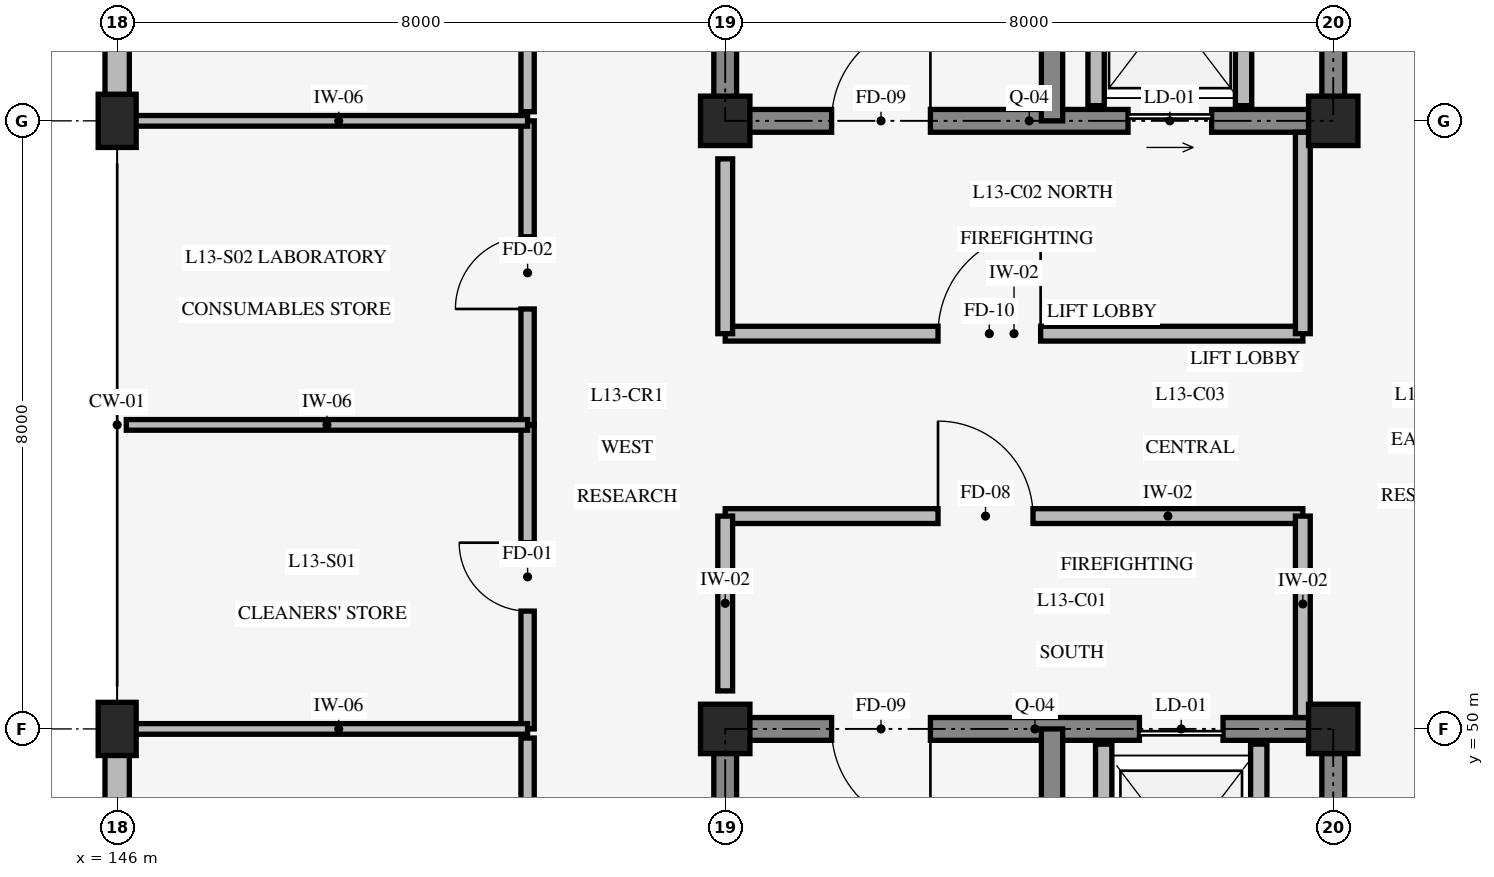
"""IFC4 building model, lengths in metres.
Left out: names, types, materials, properties, quantities, classifications, styles, units other than length and angle.
Written with IfcOpenShell. Run it as: python <this file> out.ifc"""

import sys

from ifc_helpers import new_model, si_unit, direction, frame, frame_2d, origin, origin_2d, place, context, subcontext, project, spatial, rectangle, extrude, element, fill, save


model = new_model("IFC4")
c1 = context("Model", 3, precision=1e-05, world=origin(), true_north=direction((0.0, 1.0)))
c2 = subcontext(c1, "Body", "Model", "MODEL_VIEW")
j1 = project(units=[si_unit("LENGTHUNIT", "METRE"), si_unit("PLANEANGLEUNIT", "RADIAN")], contexts=[c1])
p1 = place(None, origin())
s1 = spatial("IfcSite", under=j1, at=p1, CompositionType="ELEMENT")
p2 = place(p1, origin())
s2 = spatial("IfcBuilding", under=s1, at=p2, CompositionType="ELEMENT")
p3 = place(p2, frame((0.0, 0.0, 52.8)))
s3 = spatial("IfcBuildingStorey", under=s2, at=p3, CompositionType="ELEMENT", Elevation=52.8)
p4 = place(p3, frame((162.0, 42.0, 0.0), z_axis=(0.0, 0.0, 1.0), x_axis=(0.0, 1.0, 0.0)))
e1 = element("IfcWall", 1, at=p4, inside=s3, PredefinedType="SHEAR", context=c2, shape_type="SweptSolid", body=[
    extrude(rectangle(XDim=8.0, YDim=0.3, at=frame_2d((4.0, 0.0))), origin(), (0.0, 0.0, 1.0), 3.95),
])
p5 = place(p4, frame((3.175, 0.0, 0.0)))
e2 = element("IfcOpeningElement", 2, at=p5, cuts=e1, PredefinedType="OPENING", context=c2, shape_type="SweptSolid", body=[
    extrude(rectangle(XDim=1.05, YDim=2.2, at=frame_2d((0.525, 1.1))), frame((0.0, 0.16, 0.0), z_axis=(0.0, -1.0, 0.0), x_axis=(1.0, 0.0, 0.0)), (0.0, 0.0, 1.0), 0.32),
])
p6 = place(p3, frame((162.0, 50.0, 0.0), z_axis=(0.0, 0.0, 1.0), x_axis=(-1.0, 0.0, 0.0)))
e3 = element("IfcWall", 3, at=p6, inside=s3, PredefinedType="SHEAR", context=c2, shape_type="SweptSolid", body=[
    extrude(rectangle(XDim=8.0, YDim=0.3, at=frame_2d((4.0, 0.0))), origin(), (0.0, 0.0, 1.0), 3.95),
])
p7 = place(p6, frame((5.3, 0.0, 0.0)))
e4 = element("IfcOpeningElement", 4, at=p7, cuts=e3, PredefinedType="OPENING", context=c2, shape_type="SweptSolid", body=[
    extrude(rectangle(XDim=1.3, YDim=2.15, at=frame_2d((0.65, 1.075))), frame((0.0, 0.16, 0.0), z_axis=(0.0, -1.0, 0.0), x_axis=(1.0, 0.0, 0.0)), (0.0, 0.0, 1.0), 0.32),
])
p8 = place(p6, frame((1.45, 0.0, 0.0)))
e5 = element("IfcOpeningElement", 5, at=p8, cuts=e3, PredefinedType="OPENING", context=c2, shape_type="SweptSolid", body=[
    extrude(rectangle(XDim=1.1, YDim=2.2, at=frame_2d((0.55, 1.1))), frame((0.0, 0.16, 0.0), z_axis=(0.0, -1.0, 0.0), x_axis=(1.0, 0.0, 0.0)), (0.0, 0.0, 1.0), 0.32),
])
p9 = place(p3, frame((154.0, 50.0, 0.0), z_axis=(0.0, 0.0, 1.0), x_axis=(0.0, -1.0, 0.0)))
e6 = element("IfcWall", 6, at=p9, inside=s3, PredefinedType="SHEAR", context=c2, shape_type="SweptSolid", body=[
    extrude(rectangle(XDim=8.0, YDim=0.3, at=frame_2d((4.0, 0.0))), origin(), (0.0, 0.0, 1.0), 3.95),
])
p10 = place(p3, frame((158.3, 42.0, 0.0), z_axis=(0.0, 0.0, 1.0), x_axis=(0.0, 1.0, 0.0)))
e7 = element("IfcWall", 7, at=p10, inside=s3, PredefinedType="SHEAR", context=c2, shape_type="SweptSolid", body=[
    extrude(rectangle(XDim=8.0, YDim=0.28, at=frame_2d((4.0, 0.0))), origin(), (0.0, 0.0, 1.0), 3.95),
])
p11 = place(p3, frame((154.0, 58.0, 0.0), z_axis=(0.0, 0.0, 1.0), x_axis=(1.0, 0.0, 0.0)))
e8 = element("IfcWall", 8, at=p11, inside=s3, PredefinedType="SHEAR", context=c2, shape_type="SweptSolid", body=[
    extrude(rectangle(XDim=8.0, YDim=0.3, at=frame_2d((4.0, 0.0))), origin(), (0.0, 0.0, 1.0), 3.95),
])
p12 = place(p11, frame((1.4, 0.0, 0.0)))
e9 = element("IfcOpeningElement", 9, at=p12, cuts=e8, PredefinedType="OPENING", context=c2, shape_type="SweptSolid", body=[
    extrude(rectangle(XDim=1.3, YDim=2.15, at=frame_2d((0.65, 1.075))), frame((0.0, 0.16, 0.0), z_axis=(0.0, -1.0, 0.0), x_axis=(1.0, 0.0, 0.0)), (0.0, 0.0, 1.0), 0.32),
])
p13 = place(p11, frame((5.3, 0.0, 0.0)))
e10 = element("IfcOpeningElement", 10, at=p13, cuts=e8, PredefinedType="OPENING", context=c2, shape_type="SweptSolid", body=[
    extrude(rectangle(XDim=1.1, YDim=2.2, at=frame_2d((0.55, 1.1))), frame((0.0, 0.16, 0.0), z_axis=(0.0, -1.0, 0.0), x_axis=(1.0, 0.0, 0.0)), (0.0, 0.0, 1.0), 0.32),
])
p14 = place(p3, frame((162.0, 58.0, 0.0), z_axis=(0.0, 0.0, 1.0), x_axis=(0.0, 1.0, 0.0)))
e11 = element("IfcWall", 11, at=p14, inside=s3, PredefinedType="SHEAR", context=c2, shape_type="SweptSolid", body=[
    extrude(rectangle(XDim=8.0, YDim=0.3, at=frame_2d((4.0, 0.0))), origin(), (0.0, 0.0, 1.0), 3.95),
])
p15 = place(p14, frame((3.275, 0.0, 0.0)))
e12 = element("IfcOpeningElement", 12, at=p15, cuts=e11, PredefinedType="OPENING", context=c2, shape_type="SweptSolid", body=[
    extrude(rectangle(XDim=1.05, YDim=2.2, at=frame_2d((0.525, 1.1))), frame((0.0, 0.16, 0.0), z_axis=(0.0, -1.0, 0.0), x_axis=(1.0, 0.0, 0.0)), (0.0, 0.0, 1.0), 0.32),
])
p16 = place(p14, frame((5.45, 0.0, 0.0)))
e13 = element("IfcOpeningElement", 13, at=p16, cuts=e11, PredefinedType="OPENING", context=c2, shape_type="SweptSolid", body=[
    extrude(rectangle(XDim=1.4, YDim=2.3, at=frame_2d((0.7, 1.15))), frame((0.0, 0.16, 0.0), z_axis=(0.0, -1.0, 0.0), x_axis=(1.0, 0.0, 0.0)), (0.0, 0.0, 1.0), 0.32),
])
p17 = place(p3, frame((154.0, 66.0, 0.0), z_axis=(0.0, 0.0, 1.0), x_axis=(0.0, -1.0, 0.0)))
e14 = element("IfcWall", 14, at=p17, inside=s3, PredefinedType="SHEAR", context=c2, shape_type="SweptSolid", body=[
    extrude(rectangle(XDim=8.0, YDim=0.3, at=frame_2d((4.0, 0.0))), origin(), (0.0, 0.0, 1.0), 3.95),
])
p18 = place(p3, frame((158.3, 58.0, 0.0), z_axis=(0.0, 0.0, 1.0), x_axis=(0.0, 1.0, 0.0)))
e15 = element("IfcWall", 15, at=p18, inside=s3, PredefinedType="SHEAR", context=c2, shape_type="SweptSolid", body=[
    extrude(rectangle(XDim=8.0, YDim=0.28, at=frame_2d((4.0, 0.0))), origin(), (0.0, 0.0, 1.0), 3.95),
])
for number, where, z_axis, x_axis in (
    (16, (146.0, 50.0, 0.0), (0.0, 0.0, 1.0), (1.0, 0.0, 0.0)),
    (17, (146.0, 58.0, 0.0), (0.0, 0.0, 1.0), (1.0, 0.0, 0.0)),
):
    element("IfcColumn", number, at=place(p3, frame(where, z_axis=z_axis, x_axis=x_axis)), inside=s3, PredefinedType="COLUMN", context=c2, shape_type="SweptSolid", body=[
        extrude(rectangle(XDim=0.5, YDim=0.7, at=origin_2d()), origin(), (0.0, 0.0, 1.0), 4.2),
    ])
for number, where, z_axis, x_axis in (
    (18, (154.0, 50.0, 0.0), (0.0, 0.0, 1.0), (1.0, 0.0, 0.0)),
    (19, (154.0, 58.0, 0.0), (0.0, 0.0, 1.0), (1.0, 0.0, 0.0)),
    (20, (162.0, 50.0, 0.0), (0.0, 0.0, 1.0), (1.0, 0.0, 0.0)),
    (21, (162.0, 58.0, 0.0), (0.0, 0.0, 1.0), (1.0, 0.0, 0.0)),
):
    element("IfcColumn", number, at=place(p3, frame(where, z_axis=z_axis, x_axis=x_axis)), inside=s3, PredefinedType="COLUMN", context=c2, shape_type="SweptSolid", body=[
        extrude(rectangle(XDim=0.65, YDim=0.65, at=origin_2d()), origin(), (0.0, 0.0, 1.0), 4.2),
    ])
p19 = place(p3, frame((146.0, 42.0, 0.0), z_axis=(0.0, 0.0, 1.0), x_axis=(0.0, 1.0, 0.0)))
e22 = element("IfcWall", 22, at=p19, inside=s3, PredefinedType="STANDARD", context=c2, shape_type="SweptSolid", body=[
    extrude(rectangle(XDim=8.0, YDim=0.32, at=frame_2d((4.0, 0.0))), origin(), (0.0, 0.0, 1.0), 3.34),
])
p20 = place(p19, frame((3.5, 0.0, 0.85)))
e23 = element("IfcOpeningElement", 23, at=p20, cuts=e22, PredefinedType="OPENING", context=c2, shape_type="SweptSolid", body=[
    extrude(rectangle(XDim=1.0, YDim=1.5, at=frame_2d((0.5, 0.75))), frame((0.0, 0.17, 0.0), z_axis=(0.0, -1.0, 0.0), x_axis=(1.0, 0.0, 0.0)), (0.0, 0.0, 1.0), 0.34),
])
p21 = place(p3, frame((146.0, 58.0, 0.0), z_axis=(0.0, 0.0, 1.0), x_axis=(0.0, 1.0, 0.0)))
e24 = element("IfcWall", 24, at=p21, inside=s3, PredefinedType="STANDARD", context=c2, shape_type="SweptSolid", body=[
    extrude(rectangle(XDim=8.0, YDim=0.32, at=frame_2d((4.0, 0.0))), origin(), (0.0, 0.0, 1.0), 3.34),
])
p22 = place(p21, frame((2.75, 0.0, 0.85)))
e25 = element("IfcOpeningElement", 25, at=p22, cuts=e24, PredefinedType="OPENING", context=c2, shape_type="SweptSolid", body=[
    extrude(rectangle(XDim=2.5, YDim=1.8, at=frame_2d((1.25, 0.9))), frame((0.0, 0.17, 0.0), z_axis=(0.0, -1.0, 0.0), x_axis=(1.0, 0.0, 0.0)), (0.0, 0.0, 1.0), 0.34),
])
for number, where, z_axis, x_axis in (
    (26, (158.98, 47.02, 0.0), (0.0, 0.0, 1.0), (0.0, 1.0, 0.0)),
    (27, (161.02, 47.02, 0.0), (0.0, 0.0, 1.0), (0.0, 1.0, 0.0)),
):
    element("IfcWall", number, at=place(p3, frame(where, z_axis=z_axis, x_axis=x_axis)), inside=s3, PredefinedType="STANDARD", context=c2, shape_type="SweptSolid", body=[
        extrude(rectangle(XDim=2.78, YDim=0.215, at=frame_2d((1.39, 0.0))), origin(), (0.0, 0.0, 1.0), 3.9),
    ])
for number, where, z_axis, x_axis in (
    (28, (160.82, 58.2, 0.0), (0.0, 0.0, 1.0), (0.0, 1.0, 0.0)),
    (29, (158.88, 58.2, 0.0), (0.0, 0.0, 1.0), (0.0, 1.0, 0.0)),
):
    element("IfcWall", number, at=place(p3, frame(where, z_axis=z_axis, x_axis=x_axis)), inside=s3, PredefinedType="STANDARD", context=c2, shape_type="SweptSolid", body=[
        extrude(rectangle(XDim=2.55, YDim=0.215, at=frame_2d((1.275, 0.0))), origin(), (0.0, 0.0, 1.0), 3.9),
    ])
p23 = place(p3, frame((154.0, 52.8, 0.0), z_axis=(0.0, 0.0, 1.0), x_axis=(1.0, 0.0, 0.0)))
e30 = element("IfcWall", 30, at=p23, inside=s3, PredefinedType="STANDARD", context=c2, shape_type="SweptSolid", body=[
    extrude(rectangle(XDim=7.6, YDim=0.195, at=frame_2d((3.8, 0.0))), origin(), (0.0, 0.0, 1.0), 3.9),
])
p24 = place(p23, frame((2.8, 0.0, 0.0)))
e31 = element("IfcOpeningElement", 31, at=p24, cuts=e30, PredefinedType="OPENING", context=c2, shape_type="SweptSolid", body=[
    extrude(rectangle(XDim=1.25, YDim=2.15, at=frame_2d((0.625, 1.075))), frame((0.0, 0.107, 0.0), z_axis=(0.0, -1.0, 0.0), x_axis=(1.0, 0.0, 0.0)), (0.0, 0.0, 1.0), 0.215),
])
p25 = place(p3, frame((161.6, 50.15, 0.0), z_axis=(0.0, 0.0, 1.0), x_axis=(0.0, 1.0, 0.0)))
e32 = element("IfcWall", 32, at=p25, inside=s3, PredefinedType="STANDARD", context=c2, shape_type="SweptSolid", body=[
    extrude(rectangle(XDim=2.65, YDim=0.195, at=frame_2d((1.325, 0.0))), origin(), (0.0, 0.0, 1.0), 3.34),
])
p26 = place(p3, frame((154.0, 50.5, 0.0), z_axis=(0.0, 0.0, 1.0), x_axis=(0.0, 1.0, 0.0)))
e33 = element("IfcWall", 33, at=p26, inside=s3, PredefinedType="STANDARD", context=c2, shape_type="SweptSolid", body=[
    extrude(rectangle(XDim=2.3, YDim=0.195, at=frame_2d((1.15, 0.0))), origin(), (0.0, 0.0, 1.0), 3.34),
])
p27 = place(p3, frame((154.0, 55.2, 0.0), z_axis=(0.0, 0.0, 1.0), x_axis=(1.0, 0.0, 0.0)))
e34 = element("IfcWall", 34, at=p27, inside=s3, PredefinedType="STANDARD", context=c2, shape_type="SweptSolid", body=[
    extrude(rectangle(XDim=7.6, YDim=0.195, at=frame_2d((3.8, 0.0))), origin(), (0.0, 0.0, 1.0), 3.9),
])
p28 = place(p27, frame((2.8, 0.0, 0.0)))
e35 = element("IfcOpeningElement", 35, at=p28, cuts=e34, PredefinedType="OPENING", context=c2, shape_type="SweptSolid", body=[
    extrude(rectangle(XDim=1.35, YDim=2.15, at=frame_2d((0.675, 1.075))), frame((0.0, 0.107, 0.0), z_axis=(0.0, -1.0, 0.0), x_axis=(1.0, 0.0, 0.0)), (0.0, 0.0, 1.0), 0.215),
])
p29 = place(p3, frame((161.6, 55.2, 0.0), z_axis=(0.0, 0.0, 1.0), x_axis=(0.0, 1.0, 0.0)))
e36 = element("IfcWall", 36, at=p29, inside=s3, PredefinedType="STANDARD", context=c2, shape_type="SweptSolid", body=[
    extrude(rectangle(XDim=2.65, YDim=0.195, at=frame_2d((1.325, 0.0))), origin(), (0.0, 0.0, 1.0), 3.34),
])
p30 = place(p3, frame((154.0, 55.2, 0.0), z_axis=(0.0, 0.0, 1.0), x_axis=(0.0, 1.0, 0.0)))
e37 = element("IfcWall", 37, at=p30, inside=s3, PredefinedType="STANDARD", context=c2, shape_type="SweptSolid", body=[
    extrude(rectangle(XDim=2.3, YDim=0.195, at=frame_2d((1.15, 0.0))), origin(), (0.0, 0.0, 1.0), 3.34),
])
p31 = place(p3, frame((151.4, 42.12, 0.0), z_axis=(0.0, 0.0, 1.0), x_axis=(0.0, 1.0, 0.0)))
e38 = element("IfcWall", 38, at=p31, inside=s3, PredefinedType="STANDARD", context=c2, shape_type="SweptSolid", body=[
    extrude(rectangle(XDim=7.76, YDim=0.175, at=frame_2d((3.88, 0.0))), origin(), (0.0, 0.0, 1.0), 3.9),
])
p32 = place(p31, frame((3.08, 0.0, 0.0)))
e39 = element("IfcOpeningElement", 39, at=p32, cuts=e38, PredefinedType="OPENING", context=c2, shape_type="SweptSolid", body=[
    extrude(rectangle(XDim=1.6, YDim=2.25, at=frame_2d((0.8, 1.125))), frame((0.0, 0.098, 0.0), z_axis=(0.0, -1.0, 0.0), x_axis=(1.0, 0.0, 0.0)), (0.0, 0.0, 1.0), 0.195),
])
p33 = place(p3, frame((151.4, 58.12, 0.0), z_axis=(0.0, 0.0, 1.0), x_axis=(0.0, 1.0, 0.0)))
e40 = element("IfcWall", 40, at=p33, inside=s3, PredefinedType="STANDARD", context=c2, shape_type="SweptSolid", body=[
    extrude(rectangle(XDim=7.83, YDim=0.175, at=frame_2d((3.915, 0.0))), origin(), (0.0, 0.0, 1.0), 3.9),
])
p34 = place(p33, frame((3.065, 0.0, 0.0)))
e41 = element("IfcOpeningElement", 41, at=p34, cuts=e40, PredefinedType="OPENING", context=c2, shape_type="SweptSolid", body=[
    extrude(rectangle(XDim=1.7, YDim=2.3, at=frame_2d((0.85, 1.15))), frame((0.0, 0.098, 0.0), z_axis=(0.0, -1.0, 0.0), x_axis=(1.0, 0.0, 0.0)), (0.0, 0.0, 1.0), 0.195),
])
p35 = place(p3, frame((151.4, 50.0, 0.0), z_axis=(0.0, 0.0, 1.0), x_axis=(0.0, 1.0, 0.0)))
e42 = element("IfcWall", 42, at=p35, inside=s3, PredefinedType="STANDARD", context=c2, shape_type="SweptSolid", body=[
    extrude(rectangle(XDim=4.0, YDim=0.175, at=frame_2d((2.0, 0.0))), origin(), (0.0, 0.0, 1.0), 3.9),
])
p36 = place(p35, frame((1.55, 0.0, 0.0)))
e43 = element("IfcOpeningElement", 43, at=p36, cuts=e42, PredefinedType="OPENING", context=c2, shape_type="SweptSolid", body=[
    extrude(rectangle(XDim=0.9, YDim=2.1, at=frame_2d((0.45, 1.05))), frame((0.0, 0.098, 0.0), z_axis=(0.0, -1.0, 0.0), x_axis=(1.0, 0.0, 0.0)), (0.0, 0.0, 1.0), 0.195),
])
p37 = place(p3, frame((151.4, 54.0, 0.0), z_axis=(0.0, 0.0, 1.0), x_axis=(0.0, 1.0, 0.0)))
e44 = element("IfcWall", 44, at=p37, inside=s3, PredefinedType="STANDARD", context=c2, shape_type="SweptSolid", body=[
    extrude(rectangle(XDim=4.0, YDim=0.175, at=frame_2d((2.0, 0.0))), origin(), (0.0, 0.0, 1.0), 3.9),
])
p38 = place(p37, frame((1.525, 0.0, 0.0)))
e45 = element("IfcOpeningElement", 45, at=p38, cuts=e44, PredefinedType="OPENING", context=c2, shape_type="SweptSolid", body=[
    extrude(rectangle(XDim=0.95, YDim=2.1, at=frame_2d((0.475, 1.05))), frame((0.0, 0.098, 0.0), z_axis=(0.0, -1.0, 0.0), x_axis=(1.0, 0.0, 0.0)), (0.0, 0.0, 1.0), 0.195),
])
p39 = place(p3, frame((146.12, 50.0, 0.0), z_axis=(0.0, 0.0, 1.0), x_axis=(1.0, 0.0, 0.0)))
e46 = element("IfcWall", 46, at=p39, inside=s3, PredefinedType="STANDARD", context=c2, shape_type="SweptSolid", body=[
    extrude(rectangle(XDim=5.28, YDim=0.14, at=frame_2d((2.64, 0.0))), origin(), (0.0, 0.0, 1.0), 3.29),
])
p40 = place(p3, frame((146.12, 54.0, 0.0), z_axis=(0.0, 0.0, 1.0), x_axis=(1.0, 0.0, 0.0)))
e47 = element("IfcWall", 47, at=p40, inside=s3, PredefinedType="STANDARD", context=c2, shape_type="SweptSolid", body=[
    extrude(rectangle(XDim=5.28, YDim=0.14, at=frame_2d((2.64, 0.0))), origin(), (0.0, 0.0, 1.0), 3.9),
])
p41 = place(p3, frame((146.12, 58.0, 0.0), z_axis=(0.0, 0.0, 1.0), x_axis=(1.0, 0.0, 0.0)))
e48 = element("IfcWall", 48, at=p41, inside=s3, PredefinedType="STANDARD", context=c2, shape_type="SweptSolid", body=[
    extrude(rectangle(XDim=5.28, YDim=0.14, at=frame_2d((2.64, 0.0))), origin(), (0.0, 0.0, 1.0), 3.29),
])
p42 = place(p7, origin())
e49 = element("IfcDoor", 49, at=p42, inside=s3, OperationType="SINGLE_SWING_LEFT", PredefinedType="DOOR", context=c2, shape_type="SweptSolid", body=[
    extrude(rectangle(XDim=1.3, YDim=2.15, at=frame_2d((0.65, 1.075))), frame((0.0, 0.025, 0.0), z_axis=(0.0, -1.0, 0.0), x_axis=(1.0, 0.0, 0.0)), (0.0, 0.0, 1.0), 0.05),
])
fill(e4, e49)
p43 = place(p8, origin())
e50 = element("IfcDoor", 50, at=p43, inside=s3, OperationType="SLIDING_TO_LEFT", PredefinedType="DOOR", context=c2, shape_type="SweptSolid", body=[
    extrude(rectangle(XDim=1.1, YDim=2.2, at=frame_2d((0.55, 1.1))), frame((0.0, 0.025, 0.0), z_axis=(0.0, -1.0, 0.0), x_axis=(1.0, 0.0, 0.0)), (0.0, 0.0, 1.0), 0.05),
])
fill(e5, e50)
p44 = place(p12, origin())
e51 = element("IfcDoor", 51, at=p44, inside=s3, OperationType="SINGLE_SWING_RIGHT", PredefinedType="DOOR", context=c2, shape_type="SweptSolid", body=[
    extrude(rectangle(XDim=1.3, YDim=2.15, at=frame_2d((0.65, 1.075))), frame((0.0, 0.025, 0.0), z_axis=(0.0, -1.0, 0.0), x_axis=(1.0, 0.0, 0.0)), (0.0, 0.0, 1.0), 0.05),
])
fill(e9, e51)
p45 = place(p13, origin())
e52 = element("IfcDoor", 52, at=p45, inside=s3, OperationType="SLIDING_TO_RIGHT", PredefinedType="DOOR", context=c2, shape_type="SweptSolid", body=[
    extrude(rectangle(XDim=1.1, YDim=2.2, at=frame_2d((0.55, 1.1))), frame((0.0, 0.025, 0.0), z_axis=(0.0, -1.0, 0.0), x_axis=(1.0, 0.0, 0.0)), (0.0, 0.0, 1.0), 0.05),
])
fill(e10, e52)
p46 = place(p24, origin())
e53 = element("IfcDoor", 53, at=p46, inside=s3, OperationType="SINGLE_SWING_LEFT", PredefinedType="DOOR", context=c2, shape_type="SweptSolid", body=[
    extrude(rectangle(XDim=1.25, YDim=2.15, at=frame_2d((0.625, 1.075))), frame((0.0, 0.025, 0.0), z_axis=(0.0, -1.0, 0.0), x_axis=(1.0, 0.0, 0.0)), (0.0, 0.0, 1.0), 0.05),
])
fill(e31, e53)
p47 = place(p28, origin())
e54 = element("IfcDoor", 54, at=p47, inside=s3, OperationType="SINGLE_SWING_RIGHT", PredefinedType="DOOR", context=c2, shape_type="SweptSolid", body=[
    extrude(rectangle(XDim=1.35, YDim=2.15, at=frame_2d((0.675, 1.075))), frame((0.0, 0.025, 0.0), z_axis=(0.0, -1.0, 0.0), x_axis=(1.0, 0.0, 0.0)), (0.0, 0.0, 1.0), 0.05),
])
fill(e35, e54)
p48 = place(p36, origin())
e55 = element("IfcDoor", 55, at=p48, inside=s3, OperationType="SINGLE_SWING_RIGHT", PredefinedType="DOOR", context=c2, shape_type="SweptSolid", body=[
    extrude(rectangle(XDim=0.9, YDim=2.1, at=frame_2d((0.45, 1.05))), frame((0.0, 0.025, 0.0), z_axis=(0.0, -1.0, 0.0), x_axis=(1.0, 0.0, 0.0)), (0.0, 0.0, 1.0), 0.05),
])
fill(e43, e55)
p49 = place(p38, origin())
e56 = element("IfcDoor", 56, at=p49, inside=s3, OperationType="SINGLE_SWING_LEFT", PredefinedType="DOOR", context=c2, shape_type="SweptSolid", body=[
    extrude(rectangle(XDim=0.95, YDim=2.1, at=frame_2d((0.475, 1.05))), frame((0.0, 0.025, 0.0), z_axis=(0.0, -1.0, 0.0), x_axis=(1.0, 0.0, 0.0)), (0.0, 0.0, 1.0), 0.05),
])
fill(e45, e56)
save(model, sys.argv[1])
